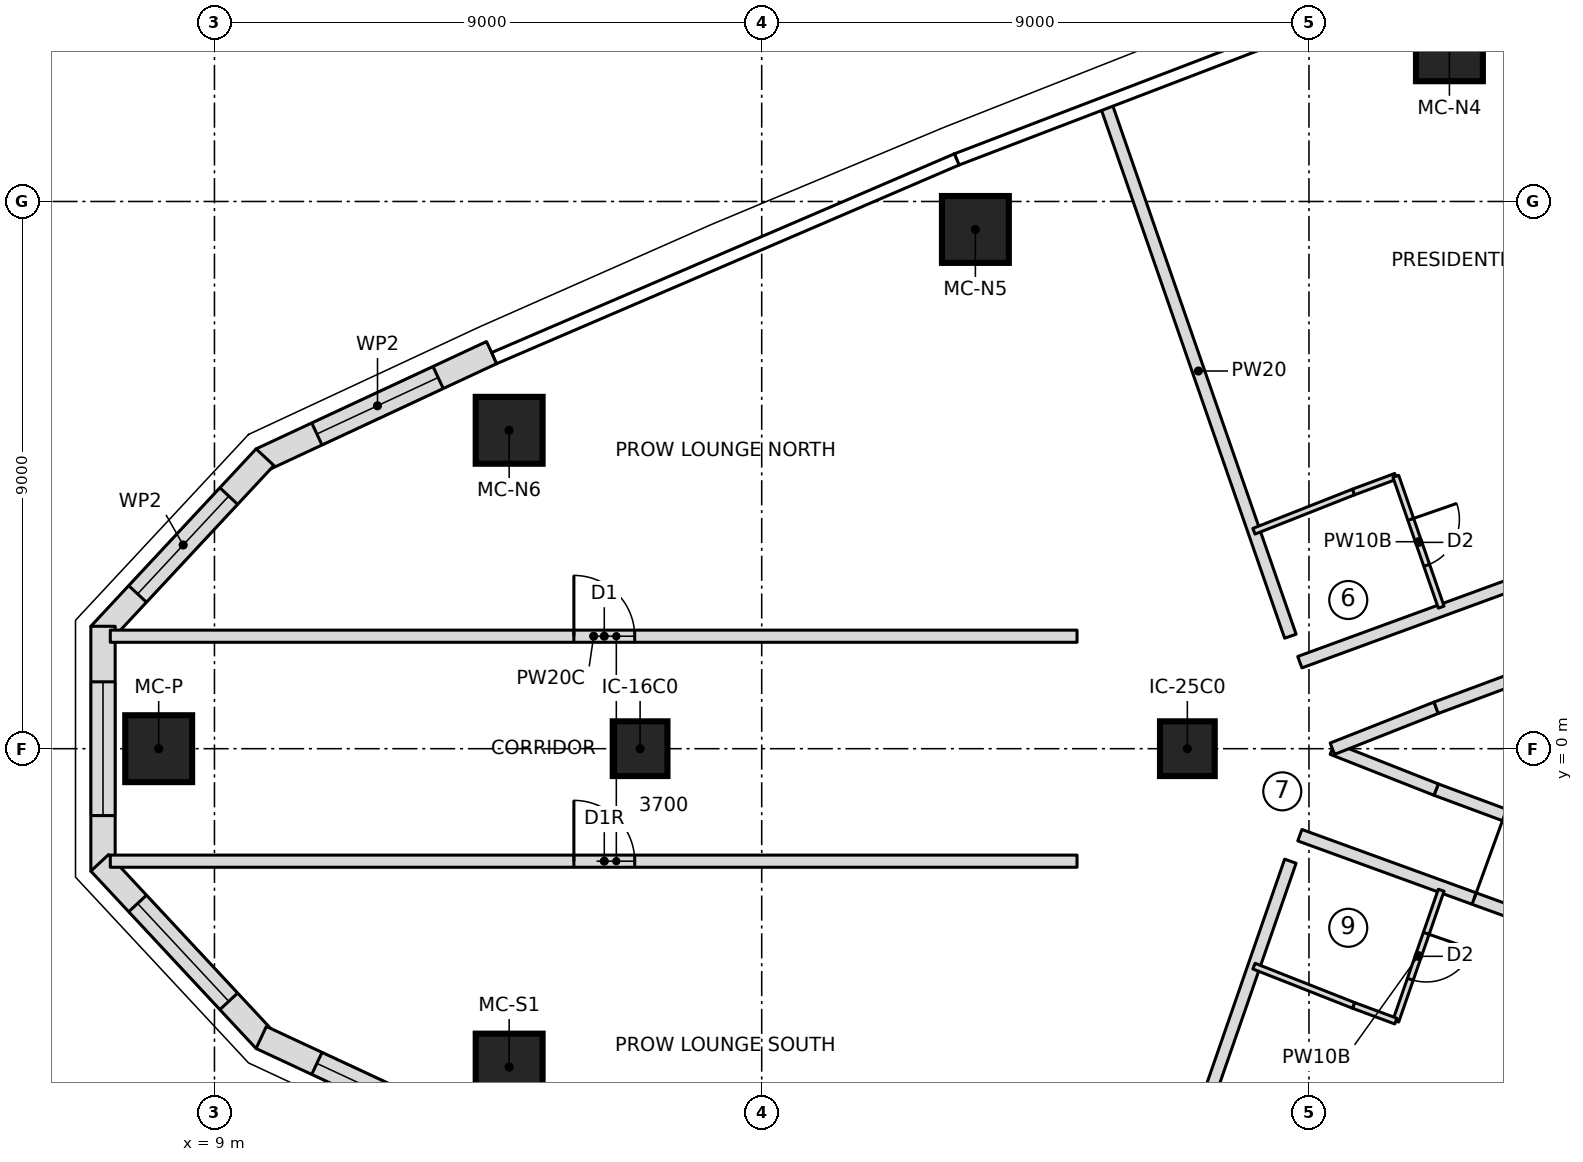
"""IFC4 building model, lengths in metres.
Left out: names, types, materials, properties, quantities, classifications, styles, units other than length and angle.
Written with IfcOpenShell. Run it as: python <this file> out.ifc"""

import sys

from ifc_helpers import new_model, si_unit, direction, frame, frame_2d, origin, origin_2d, place, context, subcontext, project, spatial, polyline, rectangle, outline, extrude, element, fill, save


model = new_model("IFC4")
c1 = context("Model", 3, precision=1e-05, world=origin(), true_north=direction((0.0, 1.0)))
c2 = subcontext(c1, "Body", "Model", "MODEL_VIEW")
j1 = project(units=[si_unit("LENGTHUNIT", "METRE"), si_unit("PLANEANGLEUNIT", "RADIAN")], contexts=[c1])
p1 = place(None, origin())
s1 = spatial("IfcSite", under=j1, at=p1, CompositionType="ELEMENT")
p2 = place(p1, origin())
s2 = spatial("IfcBuilding", under=s1, at=p2, CompositionType="ELEMENT")
p3 = place(p2, frame((0.0, 0.0, 292.75)))
s3 = spatial("IfcBuildingStorey", under=s2, at=p3, CompositionType="ELEMENT", Elevation=292.75)
for number, where, z_axis, x_axis in (
    (1, (8.083, 0.0, 0.0), (0.0, 0.0, 1.0), (1.0, 0.0, 0.0)),
    (2, (13.846, -5.237, 0.0), (0.0, 0.0, 1.0), (1.0, 0.0, 0.0)),
    (3, (29.31, 11.528, 0.0), (0.0, 0.0, 1.0), (1.0, 0.0, 0.0)),
    (4, (21.514, 8.54, 0.0), (0.0, 0.0, 1.0), (1.0, 0.0, 0.0)),
    (5, (13.846, 5.237, 0.0), (0.0, 0.0, 1.0), (1.0, 0.0, 0.0)),
):
    element("IfcColumn", number, at=place(p3, frame(where, z_axis=z_axis, x_axis=x_axis)), inside=s3, PredefinedType="COLUMN", context=c2, shape_type="SweptSolid", body=[
        extrude(rectangle(XDim=1.1, YDim=1.1, at=origin_2d()), origin(), (0.0, 0.0, 1.0), 3.55),
    ])
for number, where, z_axis, x_axis in (
    (6, (16.0, 0.0, 0.0), (0.0, 0.0, 1.0), (1.0, 0.0, 0.0)),
    (7, (25.0, 0.0, 0.0), (0.0, 0.0, 1.0), (1.0, 0.0, 0.0)),
):
    element("IfcColumn", number, at=place(p3, frame(where, z_axis=z_axis, x_axis=x_axis)), inside=s3, PredefinedType="COLUMN", context=c2, shape_type="SweptSolid", body=[
        extrude(rectangle(XDim=0.9, YDim=0.9, at=origin_2d()), origin(), (0.0, 0.0, 1.0), 3.55),
    ])
p4 = place(p3, frame((13.559, 6.515, 0.0), z_axis=(0.0, 0.0, 1.0), x_axis=(-0.906485602396, -0.42223672584, 0.0)))
e8 = element("IfcWall", 8, at=p4, inside=s3, PredefinedType="NOTDEFINED", context=c2, shape_type="SweptSolid", body=[
    extrude(outline(polyline([(0.0, -0.2), (4.181, -0.2), (4.103, 0.2), (0.0, 0.2), (0.0, -0.2)])), origin(), (0.0, 0.0, 1.0), 3.25),
])
p5 = place(p4, frame((0.971, 0.0, 0.6)))
e9 = element("IfcOpeningElement", 9, at=p5, cuts=e8, PredefinedType="OPENING", context=c2, shape_type="SweptSolid", body=[
    extrude(outline(polyline([(0.0, 1.35), (0.084, 1.771), (0.322, 2.128), (0.679, 2.366), (1.1, 2.45), (1.521, 2.366), (1.878, 2.128), (2.116, 1.771), (2.2, 1.35), (2.2, 1.1), (2.116, 0.679), (1.878, 0.322), (1.521, 0.084), (1.1, 0.0), (0.679, 0.084), (0.322, 0.322), (0.084, 0.679), (0.0, 1.1), (0.0, 1.35)])), frame((0.0, 0.21, 0.0), z_axis=(0.0, -1.0, 0.0), x_axis=(1.0, 0.0, 0.0)), (0.0, 0.0, 1.0), 0.42),
])
p6 = place(p3, frame((9.804, 4.766, 0.0), z_axis=(0.0, 0.0, 1.0), x_axis=(-0.6815467277, -0.73177459505, 0.0)))
e10 = element("IfcWall", 10, at=p6, inside=s3, PredefinedType="NOTDEFINED", context=c2, shape_type="SweptSolid", body=[
    extrude(outline(polyline([(-0.039, -0.2), (3.948, -0.2), (3.791, 0.2), (0.039, 0.2), (-0.039, -0.2)])), origin(), (0.0, 0.0, 1.0), 3.25),
])
p7 = place(p6, frame((0.835, 0.0, 0.6)))
e11 = element("IfcOpeningElement", 11, at=p7, cuts=e10, PredefinedType="OPENING", context=c2, shape_type="SweptSolid", body=[
    extrude(outline(polyline([(0.0, 1.35), (0.084, 1.771), (0.322, 2.128), (0.679, 2.366), (1.1, 2.45), (1.521, 2.366), (1.878, 2.128), (2.116, 1.771), (2.2, 1.35), (2.2, 1.1), (2.116, 0.679), (1.878, 0.322), (1.521, 0.084), (1.1, 0.0), (0.679, 0.084), (0.322, 0.322), (0.084, 0.679), (0.0, 1.1), (0.0, 1.35)])), frame((0.0, 0.21, 0.0), z_axis=(0.0, -1.0, 0.0), x_axis=(1.0, 0.0, 0.0)), (0.0, 0.0, 1.0), 0.42),
])
p8 = place(p3, frame((7.167, 1.935, 0.0), z_axis=(0.0, 0.0, 1.0), x_axis=(0.0, -1.0, 0.0)))
e12 = element("IfcWall", 12, at=p8, inside=s3, PredefinedType="NOTDEFINED", context=c2, shape_type="SweptSolid", body=[
    extrude(outline(polyline([(-0.079, -0.2), (3.948, -0.2), (3.791, 0.2), (0.079, 0.2), (-0.079, -0.2)])), origin(), (0.0, 0.0, 1.0), 3.25),
])
p9 = place(p8, frame((0.835, 0.0, 0.6)))
e13 = element("IfcOpeningElement", 13, at=p9, cuts=e12, PredefinedType="OPENING", context=c2, shape_type="SweptSolid", body=[
    extrude(outline(polyline([(0.0, 1.35), (0.084, 1.771), (0.322, 2.128), (0.679, 2.366), (1.1, 2.45), (1.521, 2.366), (1.878, 2.128), (2.116, 1.771), (2.2, 1.35), (2.2, 1.1), (2.116, 0.679), (1.878, 0.322), (1.521, 0.084), (1.1, 0.0), (0.679, 0.084), (0.322, 0.322), (0.084, 0.679), (0.0, 1.1), (0.0, 1.35)])), frame((0.0, 0.21, 0.0), z_axis=(0.0, -1.0, 0.0), x_axis=(1.0, 0.0, 0.0)), (0.0, 0.0, 1.0), 0.42),
])
p10 = place(p3, frame((7.167, -1.935, 0.0), z_axis=(0.0, 0.0, 1.0), x_axis=(0.6815467277, -0.73177459505, 0.0)))
e14 = element("IfcWall", 14, at=p10, inside=s3, PredefinedType="NOTDEFINED", context=c2, shape_type="SweptSolid", body=[
    extrude(outline(polyline([(-0.079, -0.2), (3.908, -0.2), (3.83, 0.2), (0.079, 0.2), (-0.079, -0.2)])), origin(), (0.0, 0.0, 1.0), 3.25),
])
p11 = place(p10, frame((0.835, 0.0, 0.6)))
e15 = element("IfcOpeningElement", 15, at=p11, cuts=e14, PredefinedType="OPENING", context=c2, shape_type="SweptSolid", body=[
    extrude(outline(polyline([(0.0, 1.35), (0.084, 1.771), (0.322, 2.128), (0.679, 2.366), (1.1, 2.45), (1.521, 2.366), (1.878, 2.128), (2.116, 1.771), (2.2, 1.35), (2.2, 1.1), (2.116, 0.679), (1.878, 0.322), (1.521, 0.084), (1.1, 0.0), (0.679, 0.084), (0.322, 0.322), (0.084, 0.679), (0.0, 1.1), (0.0, 1.35)])), frame((0.0, 0.21, 0.0), z_axis=(0.0, -1.0, 0.0), x_axis=(1.0, 0.0, 0.0)), (0.0, 0.0, 1.0), 0.42),
])
p12 = place(p3, frame((9.804, -4.766, 0.0), z_axis=(0.0, 0.0, 1.0), x_axis=(0.906485602396, -0.42223672584, 0.0)))
e16 = element("IfcWall", 16, at=p12, inside=s3, PredefinedType="NOTDEFINED", context=c2, shape_type="SweptSolid", body=[
    extrude(outline(polyline([(-0.039, -0.2), (4.142, -0.2), (4.142, 0.2), (0.039, 0.2), (-0.039, -0.2)])), origin(), (0.0, 0.0, 1.0), 3.25),
])
p13 = place(p12, frame((0.971, 0.0, 0.6)))
e17 = element("IfcOpeningElement", 17, at=p13, cuts=e16, PredefinedType="OPENING", context=c2, shape_type="SweptSolid", body=[
    extrude(outline(polyline([(0.0, 1.35), (0.084, 1.771), (0.322, 2.128), (0.679, 2.366), (1.1, 2.45), (1.521, 2.366), (1.878, 2.128), (2.116, 1.771), (2.2, 1.35), (2.2, 1.1), (2.116, 0.679), (1.878, 0.322), (1.521, 0.084), (1.1, 0.0), (0.679, 0.084), (0.322, 0.322), (0.084, 0.679), (0.0, 1.1), (0.0, 1.35)])), frame((0.0, 0.21, 0.0), z_axis=(0.0, -1.0, 0.0), x_axis=(1.0, 0.0, 0.0)), (0.0, 0.0, 1.0), 0.42),
])
p14 = place(p3, frame((7.287, 1.85, 0.0), z_axis=(0.0, 0.0, 1.0), x_axis=(1.0, 0.0, 0.0)))
e18 = element("IfcWall", 18, at=p14, inside=s3, PredefinedType="PARTITIONING", context=c2, shape_type="SweptSolid", body=[
    extrude(rectangle(XDim=15.899, YDim=0.2, at=frame_2d((7.949, 0.0))), origin(), (0.0, 0.0, 1.0), 3.25),
])
p15 = place(p14, frame((7.624, 0.0, 0.0)))
e19 = element("IfcOpeningElement", 19, at=p15, cuts=e18, PredefinedType="OPENING", context=c2, shape_type="SweptSolid", body=[
    extrude(rectangle(XDim=1.0, YDim=2.1, at=frame_2d((0.5, 1.05))), frame((0.0, 0.11, 0.0), z_axis=(0.0, -1.0, 0.0), x_axis=(1.0, 0.0, 0.0)), (0.0, 0.0, 1.0), 0.22),
])
p16 = place(p3, frame((7.287, -1.85, 0.0), z_axis=(0.0, 0.0, 1.0), x_axis=(1.0, 0.0, 0.0)))
e20 = element("IfcWall", 20, at=p16, inside=s3, PredefinedType="PARTITIONING", context=c2, shape_type="SweptSolid", body=[
    extrude(rectangle(XDim=15.899, YDim=0.2, at=frame_2d((7.949, 0.0))), origin(), (0.0, 0.0, 1.0), 3.25),
])
p17 = place(p16, frame((7.624, 0.0, 0.0)))
e21 = element("IfcOpeningElement", 21, at=p17, cuts=e20, PredefinedType="OPENING", context=c2, shape_type="SweptSolid", body=[
    extrude(rectangle(XDim=1.0, YDim=2.1, at=frame_2d((0.5, 1.05))), frame((0.0, 0.11, 0.0), z_axis=(0.0, -1.0, 0.0), x_axis=(1.0, 0.0, 0.0)), (0.0, 0.0, 1.0), 0.22),
])
p18 = place(p3, frame((26.694, 1.85, 0.0), z_axis=(0.0, 0.0, 1.0), x_axis=(-0.327714422317, 0.944776829418, 0.0)))
e22 = element("IfcWall", 22, at=p18, inside=s3, PredefinedType="PARTITIONING", context=c2, shape_type="SweptSolid", body=[
    extrude(rectangle(XDim=9.233, YDim=0.2, at=frame_2d((4.617, 0.0))), origin(), (0.0, 0.0, 1.0), 3.25),
])
p19 = place(p3, frame((36.064, 4.794, 0.0), z_axis=(0.0, 0.0, 1.0), x_axis=(-0.93911227702, -0.34361043516, 0.0)))
e23 = element("IfcWall", 23, at=p19, inside=s3, PredefinedType="PARTITIONING", context=c2, shape_type="SweptSolid", body=[
    extrude(rectangle(XDim=9.812, YDim=0.2, at=frame_2d((4.906, 0.0))), origin(), (0.0, 0.0, 1.0), 3.25),
])
p20 = place(p19, frame((0.35, 0.0, 0.0)))
e24 = element("IfcOpeningElement", 24, at=p20, cuts=e23, PredefinedType="OPENING", context=c2, shape_type="SweptSolid", body=[
    extrude(rectangle(XDim=1.0, YDim=2.1, at=frame_2d((0.5, 1.05))), frame((0.0, 0.11, 0.0), z_axis=(0.0, -1.0, 0.0), x_axis=(1.0, 0.0, 0.0)), (0.0, 0.0, 1.0), 0.22),
])
p21 = place(p3, frame((26.096, 3.576, 0.0), z_axis=(0.0, 0.0, 1.0), x_axis=(0.930254925629, 0.366913850028, 0.0)))
e25 = element("IfcWall", 25, at=p21, inside=s3, PredefinedType="PARTITIONING", context=c2, shape_type="SweptSolid", body=[
    extrude(rectangle(XDim=1.76, YDim=0.1, at=frame_2d((0.88, 0.0))), origin(), (0.0, 0.0, 1.0), 3.25),
])
p22 = place(p3, frame((27.733, 4.222, 0.0), z_axis=(0.0, 0.0, 1.0), x_axis=(0.937514267289, 0.347946833049, 0.0)))
e26 = element("IfcWall", 26, at=p22, inside=s3, PredefinedType="PARTITIONING", context=c2, shape_type="SweptSolid", body=[
    extrude(rectangle(XDim=0.742, YDim=0.1, at=frame_2d((0.371, 0.0))), origin(), (0.0, 0.0, 1.0), 3.25),
])
p23 = place(p3, frame((28.428, 4.48, 0.0), z_axis=(0.0, 0.0, 1.0), x_axis=(0.327718024288, -0.944775579996, 0.0)))
e27 = element("IfcWall", 27, at=p23, inside=s3, PredefinedType="PARTITIONING", context=c2, shape_type="SweptSolid", body=[
    extrude(rectangle(XDim=2.277, YDim=0.1, at=frame_2d((1.139, 0.0))), origin(), (0.0, 0.0, 1.0), 3.25),
])
p24 = place(p23, frame((0.75, 0.0, 0.0)))
e28 = element("IfcOpeningElement", 28, at=p24, cuts=e27, PredefinedType="OPENING", context=c2, shape_type="SweptSolid", body=[
    extrude(rectangle(XDim=0.8, YDim=2.1, at=frame_2d((0.4, 1.05))), frame((0.0, 0.06, 0.0), z_axis=(0.0, -1.0, 0.0), x_axis=(1.0, 0.0, 0.0)), (0.0, 0.0, 1.0), 0.12),
])
p25 = place(p3, frame((23.668, -10.573, 0.0), z_axis=(0.0, 0.0, 1.0), x_axis=(0.327714422317, 0.944776829418, 0.0)))
e29 = element("IfcWall", 29, at=p25, inside=s3, PredefinedType="PARTITIONING", context=c2, shape_type="SweptSolid", body=[
    extrude(rectangle(XDim=9.233, YDim=0.2, at=frame_2d((4.617, 0.0))), origin(), (0.0, 0.0, 1.0), 3.25),
])
p26 = place(p3, frame((26.85, -1.423, 0.0), z_axis=(0.0, 0.0, 1.0), x_axis=(0.939807953272, -0.341703103536, 0.0)))
e30 = element("IfcWall", 30, at=p26, inside=s3, PredefinedType="PARTITIONING", context=c2, shape_type="SweptSolid", body=[
    extrude(rectangle(XDim=9.811, YDim=0.2, at=frame_2d((4.906, 0.0))), origin(), (0.0, 0.0, 1.0), 3.25),
])
p27 = place(p26, frame((3.05, 0.0, 0.0)))
e31 = element("IfcOpeningElement", 31, at=p27, cuts=e30, PredefinedType="OPENING", context=c2, shape_type="SweptSolid", body=[
    extrude(rectangle(XDim=1.5, YDim=2.1, at=frame_2d((0.75, 1.05))), frame((0.0, 0.11, 0.0), z_axis=(0.0, -1.0, 0.0), x_axis=(1.0, 0.0, 0.0)), (0.0, 0.0, 1.0), 0.22),
])
p28 = place(p3, frame((29.175, -2.328, 0.0), z_axis=(0.0, 0.0, 1.0), x_axis=(-0.327718024288, -0.944775579996, 0.0)))
e32 = element("IfcWall", 32, at=p28, inside=s3, PredefinedType="PARTITIONING", context=c2, shape_type="SweptSolid", body=[
    extrude(rectangle(XDim=2.277, YDim=0.1, at=frame_2d((1.139, 0.0))), origin(), (0.0, 0.0, 1.0), 3.25),
])
p29 = place(p28, frame((0.75, 0.0, 0.0)))
e33 = element("IfcOpeningElement", 33, at=p29, cuts=e32, PredefinedType="OPENING", context=c2, shape_type="SweptSolid", body=[
    extrude(rectangle(XDim=0.8, YDim=2.1, at=frame_2d((0.4, 1.05))), frame((0.0, 0.06, 0.0), z_axis=(0.0, -1.0, 0.0), x_axis=(1.0, 0.0, 0.0)), (0.0, 0.0, 1.0), 0.12),
])
p30 = place(p3, frame((28.428, -4.48, 0.0), z_axis=(0.0, 0.0, 1.0), x_axis=(-0.937514267289, 0.347946833049, 0.0)))
e34 = element("IfcWall", 34, at=p30, inside=s3, PredefinedType="PARTITIONING", context=c2, shape_type="SweptSolid", body=[
    extrude(rectangle(XDim=0.742, YDim=0.1, at=frame_2d((0.371, 0.0))), origin(), (0.0, 0.0, 1.0), 3.25),
])
p31 = place(p3, frame((27.733, -4.222, 0.0), z_axis=(0.0, 0.0, 1.0), x_axis=(-0.930254925629, 0.366913850028, 0.0)))
e35 = element("IfcWall", 35, at=p31, inside=s3, PredefinedType="PARTITIONING", context=c2, shape_type="SweptSolid", body=[
    extrude(rectangle(XDim=1.76, YDim=0.1, at=frame_2d((0.88, 0.0))), origin(), (0.0, 0.0, 1.0), 3.25),
])
p32 = place(p3, frame((32.76, -2.035, 0.0), z_axis=(0.0, 0.0, 1.0), x_axis=(-0.937460178932, 0.348092534992, 0.0)))
e36 = element("IfcWall", 36, at=p32, inside=s3, PredefinedType="PARTITIONING", context=c2, shape_type="SweptSolid", body=[
    extrude(rectangle(XDim=3.913, YDim=0.2, at=frame_2d((1.957, 0.0))), origin(), (0.0, 0.0, 1.0), 3.25),
])
p33 = place(p32, frame((1.457, 0.0, 0.0)))
e37 = element("IfcOpeningElement", 37, at=p33, cuts=e36, PredefinedType="OPENING", context=c2, shape_type="SweptSolid", body=[
    extrude(rectangle(XDim=1.0, YDim=2.1, at=frame_2d((0.5, 1.05))), frame((0.0, 0.11, 0.0), z_axis=(0.0, -1.0, 0.0), x_axis=(1.0, 0.0, 0.0)), (0.0, 0.0, 1.0), 0.22),
])
for number, where, z_axis, x_axis in (
    (38, (29.092, -0.673, 0.0), (0.0, 0.0, 1.0), (-0.93, 0.367, 0.0)),
    (39, (27.385, 0.0, 0.0), (0.0, 0.0, 1.0), (0.93, 0.367, 0.0)),
):
    element("IfcWall", number, at=place(p3, frame(where, z_axis=z_axis, x_axis=x_axis)), inside=s3, PredefinedType="PARTITIONING", context=c2, shape_type="SweptSolid", body=[
        extrude(rectangle(XDim=1.834, YDim=0.2, at=frame_2d((0.917, 0.0))), origin(), (0.0, 0.0, 1.0), 3.25),
    ])
p34 = place(p3, frame((29.092, 0.673, 0.0), z_axis=(0.0, 0.0, 1.0), x_axis=(0.937460178932, 0.348092534992, 0.0)))
e40 = element("IfcWall", 40, at=p34, inside=s3, PredefinedType="PARTITIONING", context=c2, shape_type="SweptSolid", body=[
    extrude(rectangle(XDim=3.913, YDim=0.2, at=frame_2d((1.957, 0.0))), origin(), (0.0, 0.0, 1.0), 3.25),
])
p35 = place(p5, origin())
e41 = element("IfcWindow", 41, at=p35, inside=s3, PartitioningType="SINGLE_PANEL", PredefinedType="WINDOW", context=c2, shape_type="SweptSolid", body=[
    extrude(outline(polyline([(0.0, 1.35), (0.084, 1.771), (0.322, 2.128), (0.679, 2.366), (1.1, 2.45), (1.521, 2.366), (1.878, 2.128), (2.116, 1.771), (2.2, 1.35), (2.2, 1.1), (2.116, 0.679), (1.878, 0.322), (1.521, 0.084), (1.1, 0.0), (0.679, 0.084), (0.322, 0.322), (0.084, 0.679), (0.0, 1.1), (0.0, 1.35)])), frame((0.0, 0.17, 0.0), z_axis=(0.0, -1.0, 0.0), x_axis=(1.0, 0.0, 0.0)), (0.0, 0.0, 1.0), 0.06),
])
fill(e9, e41)
p36 = place(p7, origin())
e42 = element("IfcWindow", 42, at=p36, inside=s3, PartitioningType="SINGLE_PANEL", PredefinedType="WINDOW", context=c2, shape_type="SweptSolid", body=[
    extrude(outline(polyline([(0.0, 1.35), (0.084, 1.771), (0.322, 2.128), (0.679, 2.366), (1.1, 2.45), (1.521, 2.366), (1.878, 2.128), (2.116, 1.771), (2.2, 1.35), (2.2, 1.1), (2.116, 0.679), (1.878, 0.322), (1.521, 0.084), (1.1, 0.0), (0.679, 0.084), (0.322, 0.322), (0.084, 0.679), (0.0, 1.1), (0.0, 1.35)])), frame((0.0, 0.17, 0.0), z_axis=(0.0, -1.0, 0.0), x_axis=(1.0, 0.0, 0.0)), (0.0, 0.0, 1.0), 0.06),
])
fill(e11, e42)
p37 = place(p9, origin())
e43 = element("IfcWindow", 43, at=p37, inside=s3, PartitioningType="SINGLE_PANEL", PredefinedType="WINDOW", context=c2, shape_type="SweptSolid", body=[
    extrude(outline(polyline([(0.0, 1.35), (0.084, 1.771), (0.322, 2.128), (0.679, 2.366), (1.1, 2.45), (1.521, 2.366), (1.878, 2.128), (2.116, 1.771), (2.2, 1.35), (2.2, 1.1), (2.116, 0.679), (1.878, 0.322), (1.521, 0.084), (1.1, 0.0), (0.679, 0.084), (0.322, 0.322), (0.084, 0.679), (0.0, 1.1), (0.0, 1.35)])), frame((0.0, 0.17, 0.0), z_axis=(0.0, -1.0, 0.0), x_axis=(1.0, 0.0, 0.0)), (0.0, 0.0, 1.0), 0.06),
])
fill(e13, e43)
p38 = place(p11, origin())
e44 = element("IfcWindow", 44, at=p38, inside=s3, PartitioningType="SINGLE_PANEL", PredefinedType="WINDOW", context=c2, shape_type="SweptSolid", body=[
    extrude(outline(polyline([(0.0, 1.35), (0.084, 1.771), (0.322, 2.128), (0.679, 2.366), (1.1, 2.45), (1.521, 2.366), (1.878, 2.128), (2.116, 1.771), (2.2, 1.35), (2.2, 1.1), (2.116, 0.679), (1.878, 0.322), (1.521, 0.084), (1.1, 0.0), (0.679, 0.084), (0.322, 0.322), (0.084, 0.679), (0.0, 1.1), (0.0, 1.35)])), frame((0.0, 0.17, 0.0), z_axis=(0.0, -1.0, 0.0), x_axis=(1.0, 0.0, 0.0)), (0.0, 0.0, 1.0), 0.06),
])
fill(e15, e44)
p39 = place(p13, origin())
e45 = element("IfcWindow", 45, at=p39, inside=s3, PartitioningType="SINGLE_PANEL", PredefinedType="WINDOW", context=c2, shape_type="SweptSolid", body=[
    extrude(outline(polyline([(0.0, 1.35), (0.084, 1.771), (0.322, 2.128), (0.679, 2.366), (1.1, 2.45), (1.521, 2.366), (1.878, 2.128), (2.116, 1.771), (2.2, 1.35), (2.2, 1.1), (2.116, 0.679), (1.878, 0.322), (1.521, 0.084), (1.1, 0.0), (0.679, 0.084), (0.322, 0.322), (0.084, 0.679), (0.0, 1.1), (0.0, 1.35)])), frame((0.0, 0.17, 0.0), z_axis=(0.0, -1.0, 0.0), x_axis=(1.0, 0.0, 0.0)), (0.0, 0.0, 1.0), 0.06),
])
fill(e17, e45)
p40 = place(p15, origin())
e46 = element("IfcDoor", 46, at=p40, inside=s3, OperationType="SINGLE_SWING_LEFT", PredefinedType="DOOR", context=c2, shape_type="SweptSolid", body=[
    extrude(rectangle(XDim=1.0, YDim=2.1, at=frame_2d((0.5, 1.05))), frame((0.0, 0.025, 0.0), z_axis=(0.0, -1.0, 0.0), x_axis=(1.0, 0.0, 0.0)), (0.0, 0.0, 1.0), 0.05),
])
fill(e19, e46)
p41 = place(p17, origin())
e47 = element("IfcDoor", 47, at=p41, inside=s3, OperationType="SINGLE_SWING_RIGHT", PredefinedType="DOOR", context=c2, shape_type="SweptSolid", body=[
    extrude(rectangle(XDim=1.0, YDim=2.1, at=frame_2d((0.5, 1.05))), frame((0.0, 0.025, 0.0), z_axis=(0.0, -1.0, 0.0), x_axis=(1.0, 0.0, 0.0)), (0.0, 0.0, 1.0), 0.05),
])
fill(e21, e47)
p42 = place(p24, origin())
e48 = element("IfcDoor", 48, at=p42, inside=s3, OperationType="SINGLE_SWING_LEFT", PredefinedType="DOOR", context=c2, shape_type="SweptSolid", body=[
    extrude(rectangle(XDim=0.8, YDim=2.1, at=frame_2d((0.4, 1.05))), frame((0.0, 0.025, 0.0), z_axis=(0.0, -1.0, 0.0), x_axis=(1.0, 0.0, 0.0)), (0.0, 0.0, 1.0), 0.05),
])
fill(e28, e48)
p43 = place(p29, origin())
e49 = element("IfcDoor", 49, at=p43, inside=s3, OperationType="SINGLE_SWING_LEFT", PredefinedType="DOOR", context=c2, shape_type="SweptSolid", body=[
    extrude(rectangle(XDim=0.8, YDim=2.1, at=frame_2d((0.4, 1.05))), frame((0.0, 0.025, 0.0), z_axis=(0.0, -1.0, 0.0), x_axis=(1.0, 0.0, 0.0)), (0.0, 0.0, 1.0), 0.05),
])
fill(e33, e49)
p44 = place(p27, origin())
e50 = element("IfcDoor", 50, at=p44, inside=s3, OperationType="DOUBLE_DOOR_SINGLE_SWING", PredefinedType="DOOR", context=c2, shape_type="SweptSolid", body=[
    extrude(rectangle(XDim=1.5, YDim=2.1, at=frame_2d((0.75, 1.05))), frame((0.0, 0.025, 0.0), z_axis=(0.0, -1.0, 0.0), x_axis=(1.0, 0.0, 0.0)), (0.0, 0.0, 1.0), 0.05),
])
fill(e31, e50)
save(model, sys.argv[1])
